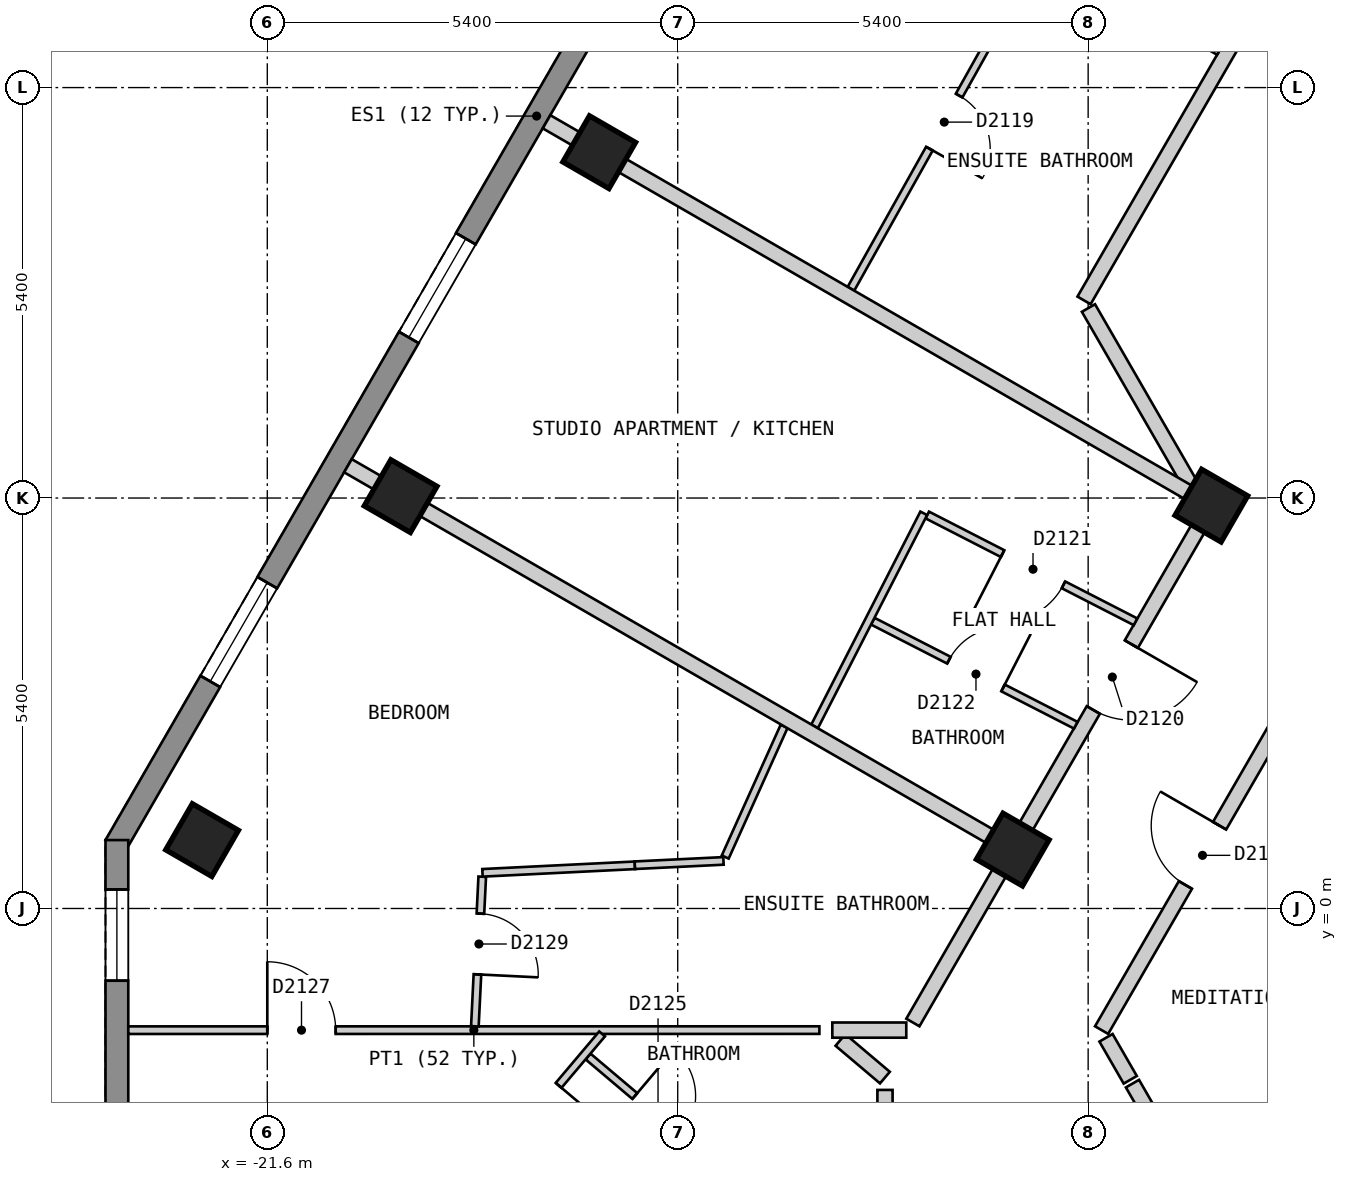
"""IFC4 building model, lengths in metres.
Left out: names, types, materials, properties, quantities, classifications, styles, units other than length and angle.
Written with IfcOpenShell. Run it as: python <this file> out.ifc"""

import sys

from ifc_helpers import new_model, si_unit, direction, frame, frame_2d, origin, origin_2d, place, context, subcontext, project, spatial, polyline, rectangle, outline, extrude, element, fill, save


model = new_model("IFC4")
c1 = context("Model", 3, precision=1e-05, world=origin(), true_north=direction((0.0, 1.0)))
c2 = subcontext(c1, "Body", "Model", "MODEL_VIEW")
j1 = project(units=[si_unit("LENGTHUNIT", "METRE"), si_unit("PLANEANGLEUNIT", "RADIAN")], contexts=[c1])
p1 = place(None, origin())
s1 = spatial("IfcSite", under=j1, at=p1, CompositionType="ELEMENT")
p2 = place(p1, origin())
s2 = spatial("IfcBuilding", under=s1, at=p2, CompositionType="ELEMENT")
p3 = place(p2, frame((0.0, 0.0, 211.8)))
s3 = spatial("IfcBuildingStorey", under=s2, at=p3, CompositionType="ELEMENT", Elevation=211.8)
for number, where, z_axis, x_axis in (
    (1, (-17.233, 9.95, 0.0), (0.0, 0.0, 1.0), (-0.5, -0.866, 0.0)),
    (2, (-19.846, 5.425, 0.0), (0.0, 0.0, 1.0), (-0.5, -0.866, 0.0)),
    (3, (-22.458, 0.9, 0.0), (0.0, 0.0, 1.0), (-0.5, -0.866, 0.0)),
    (4, (-9.179, 5.3, 0.0), (0.0, 0.0, 1.0), (-0.5, -0.866, 0.0)),
    (5, (-11.792, 0.775, 0.0), (0.0, 0.0, 1.0), (-0.5, -0.866, 0.0)),
):
    element("IfcColumn", number, at=place(p3, frame(where, z_axis=z_axis, x_axis=x_axis)), inside=s3, PredefinedType="COLUMN", context=c2, shape_type="SweptSolid", body=[
        extrude(rectangle(XDim=0.7, YDim=0.7, at=origin_2d()), origin(), (0.0, 0.0, 1.0), 3.0),
    ])
p4 = place(p3, frame((-12.514, 20.025, 0.0), z_axis=(0.0, 0.0, 1.0), x_axis=(-0.500003656944, -0.866023292436, 0.0)))
e6 = element("IfcWall", 6, at=p4, inside=s3, PredefinedType="SOLIDWALL", context=c2, shape_type="SweptSolid", body=[
    extrude(outline(polyline([(0.0, -0.15), (22.17, -0.15), (22.09, 0.15), (0.08, 0.15), (0.0, -0.15)])), origin(), (0.0, 0.0, 1.0), 2.7),
])
p5 = place(p4, frame((2.497, 0.0, 0.15)))
e7 = element("IfcOpeningElement", 7, at=p5, cuts=e6, PredefinedType="OPENING", context=c2, shape_type="SweptSolid", body=[
    extrude(rectangle(XDim=1.5, YDim=2.1, at=frame_2d((0.75, 1.05))), frame((0.0, 0.16, 0.0), z_axis=(0.0, -1.0, 0.0), x_axis=(1.0, 0.0, 0.0)), (0.0, 0.0, 1.0), 0.32),
])
p6 = place(p4, frame((7.722, 0.0, 0.15)))
e8 = element("IfcOpeningElement", 8, at=p6, cuts=e6, PredefinedType="OPENING", context=c2, shape_type="SweptSolid", body=[
    extrude(rectangle(XDim=1.5, YDim=2.1, at=frame_2d((0.75, 1.05))), frame((0.0, 0.16, 0.0), z_axis=(0.0, -1.0, 0.0), x_axis=(1.0, 0.0, 0.0)), (0.0, 0.0, 1.0), 0.32),
])
p7 = place(p4, frame((12.948, 0.0, 0.15)))
e9 = element("IfcOpeningElement", 9, at=p7, cuts=e6, PredefinedType="OPENING", context=c2, shape_type="SweptSolid", body=[
    extrude(rectangle(XDim=1.5, YDim=2.1, at=frame_2d((0.75, 1.05))), frame((0.0, 0.16, 0.0), z_axis=(0.0, -1.0, 0.0), x_axis=(1.0, 0.0, 0.0)), (0.0, 0.0, 1.0), 0.32),
])
p8 = place(p4, frame((18.173, 0.0, 0.15)))
e10 = element("IfcOpeningElement", 10, at=p8, cuts=e6, PredefinedType="OPENING", context=c2, shape_type="SweptSolid", body=[
    extrude(rectangle(XDim=1.5, YDim=2.1, at=frame_2d((0.75, 1.05))), frame((0.0, 0.16, 0.0), z_axis=(0.0, -1.0, 0.0), x_axis=(1.0, 0.0, 0.0)), (0.0, 0.0, 1.0), 0.32),
])
p9 = place(p3, frame((-23.579, 0.9, 0.0), z_axis=(0.0, 0.0, 1.0), x_axis=(0.0, -1.0, 0.0)))
e11 = element("IfcWall", 11, at=p9, inside=s3, PredefinedType="SOLIDWALL", context=c2, shape_type="SweptSolid", body=[
    extrude(outline(polyline([(0.0, -0.15), (5.0, -0.15), (4.92, 0.15), (0.08, 0.15), (0.0, -0.15)])), origin(), (0.0, 0.0, 1.0), 2.7),
])
p10 = place(p9, frame((0.65, 0.0, 0.15)))
e12 = element("IfcOpeningElement", 12, at=p10, cuts=e11, PredefinedType="OPENING", context=c2, shape_type="SweptSolid", body=[
    extrude(rectangle(XDim=1.2, YDim=2.1, at=frame_2d((0.6, 1.05))), frame((0.0, 0.16, 0.0), z_axis=(0.0, -1.0, 0.0), x_axis=(1.0, 0.0, 0.0)), (0.0, 0.0, 1.0), 0.32),
])
p11 = place(p3, frame((-10.796, 7.9, 0.0), z_axis=(0.0, 0.0, 1.0), x_axis=(0.499698840221, -0.866199208659, 0.0)))
e13 = element("IfcWall", 13, at=p11, inside=s3, PredefinedType="PARTITIONING", context=c2, shape_type="SweptSolid", body=[
    extrude(rectangle(XDim=2.685, YDim=0.2, at=frame_2d((1.343, 0.0))), origin(), (0.0, 0.0, 1.0), 2.7),
])
p12 = place(p3, frame((-10.565, -1.701, 0.0), z_axis=(0.0, 0.0, 1.0), x_axis=(0.499512735409, -0.866306543416, 0.0)))
e14 = element("IfcWall", 14, at=p12, inside=s3, PredefinedType="PARTITIONING", context=c2, shape_type="SweptSolid", body=[
    extrude(rectangle(XDim=0.638, YDim=0.2, at=frame_2d((0.319, 0.0))), origin(), (0.0, 0.0, 1.0), 2.7),
])
p13 = place(p3, frame((-10.217, -2.304, 0.0), z_axis=(0.0, 0.0, 1.0), x_axis=(0.499013081552, -0.866594452117, 0.0)))
e15 = element("IfcWall", 15, at=p13, inside=s3, PredefinedType="PARTITIONING", context=c2, shape_type="SweptSolid", body=[
    extrude(rectangle(XDim=0.457, YDim=0.2, at=frame_2d((0.229, 0.0))), origin(), (0.0, 0.0, 1.0), 2.7),
])
p14 = place(p3, frame((-10.623, -1.6, 0.0), z_axis=(0.0, 0.0, 1.0), x_axis=(0.500040865889, 0.866001808567, 0.0)))
e16 = element("IfcWall", 16, at=p14, inside=s3, PredefinedType="PARTITIONING", context=c2, shape_type="SweptSolid", body=[
    extrude(rectangle(XDim=5.31, YDim=0.2, at=frame_2d((2.655, 0.0))), origin(), (0.0, 0.0, 1.0), 2.7),
])
p15 = place(p14, frame((2.205, 0.0, 0.0)))
e17 = element("IfcOpeningElement", 17, at=p15, cuts=e16, PredefinedType="OPENING", context=c2, shape_type="SweptSolid", body=[
    extrude(rectangle(XDim=0.9, YDim=2.1, at=frame_2d((0.45, 1.05))), frame((0.0, 0.11, 0.0), z_axis=(0.0, -1.0, 0.0), x_axis=(1.0, 0.0, 0.0)), (0.0, 0.0, 1.0), 0.22),
])
p16 = place(p3, frame((-13.106, -1.5, 0.0), z_axis=(0.0, 0.0, 1.0), x_axis=(0.500025705601, 0.86601056214, 0.0)))
e18 = element("IfcWall", 18, at=p16, inside=s3, PredefinedType="PARTITIONING", context=c2, shape_type="SweptSolid", body=[
    extrude(rectangle(XDim=7.735, YDim=0.2, at=frame_2d((3.868, 0.0))), origin(), (0.0, 0.0, 1.0), 2.7),
])
p17 = place(p16, frame((4.748, 0.0, 0.0)))
e19 = element("IfcOpeningElement", 19, at=p17, cuts=e18, PredefinedType="OPENING", context=c2, shape_type="SweptSolid", body=[
    extrude(rectangle(XDim=1.0, YDim=2.1, at=frame_2d((0.5, 1.05))), frame((0.0, 0.11, 0.0), z_axis=(0.0, -1.0, 0.0), x_axis=(1.0, 0.0, 0.0)), (0.0, 0.0, 1.0), 0.22),
])
p18 = place(p3, frame((-10.854, 8.0, 0.0), z_axis=(0.0, 0.0, 1.0), x_axis=(0.499997637144, 0.866026767976, 0.0)))
e20 = element("IfcWall", 20, at=p18, inside=s3, PredefinedType="PARTITIONING", context=c2, shape_type="SweptSolid", body=[
    extrude(rectangle(XDim=10.854, YDim=0.2, at=frame_2d((5.427, 0.0))), origin(), (0.0, 0.0, 1.0), 2.7),
])
p19 = place(p18, frame((9.754, 0.0, 0.0)))
e21 = element("IfcOpeningElement", 21, at=p19, cuts=e20, PredefinedType="OPENING", context=c2, shape_type="SweptSolid", body=[
    extrude(rectangle(XDim=1.0, YDim=2.1, at=frame_2d((0.5, 1.05))), frame((0.0, 0.11, 0.0), z_axis=(0.0, -1.0, 0.0), x_axis=(1.0, 0.0, 0.0)), (0.0, 0.0, 1.0), 0.22),
])
p20 = place(p3, frame((-13.473, -2.799, 0.0), z_axis=(0.0, 0.0, 1.0), x_axis=(0.0, 1.0, 0.0)))
e22 = element("IfcWall", 22, at=p20, inside=s3, PredefinedType="PARTITIONING", context=c2, shape_type="SweptSolid", body=[
    extrude(rectangle(XDim=0.412, YDim=0.2, at=frame_2d((0.206, 0.0))), origin(), (0.0, 0.0, 1.0), 2.7),
])
p21 = place(p3, frame((-12.917, 5.177, 0.0), z_axis=(0.0, 0.0, 1.0), x_axis=(0.889829844516, -0.456292502467, 0.0)))
e23 = element("IfcWall", 23, at=p21, inside=s3, PredefinedType="PARTITIONING", context=c2, shape_type="SweptSolid", body=[
    extrude(rectangle(XDim=3.079, YDim=0.1, at=frame_2d((1.54, 0.0))), origin(), (0.0, 0.0, 1.0), 2.7),
])
p22 = place(p21, frame((1.114, 0.0, 0.0)))
e24 = element("IfcOpeningElement", 24, at=p22, cuts=e23, PredefinedType="OPENING", context=c2, shape_type="SweptSolid", body=[
    extrude(rectangle(XDim=0.9, YDim=2.1, at=frame_2d((0.45, 1.05))), frame((0.0, 0.06, 0.0), z_axis=(0.0, -1.0, 0.0), x_axis=(1.0, 0.0, 0.0)), (0.0, 0.0, 1.0), 0.12),
])
p23 = place(p3, frame((-13.634, 3.78, 0.0), z_axis=(0.0, 0.0, 1.0), x_axis=(0.889908901513, -0.456138298116, 0.0)))
e25 = element("IfcWall", 25, at=p23, inside=s3, PredefinedType="PARTITIONING", context=c2, shape_type="SweptSolid", body=[
    extrude(rectangle(XDim=3.002, YDim=0.1, at=frame_2d((1.501, 0.0))), origin(), (0.0, 0.0, 1.0), 2.7),
])
p24 = place(p23, frame((1.126, 0.0, 0.0)))
e26 = element("IfcOpeningElement", 26, at=p24, cuts=e25, PredefinedType="OPENING", context=c2, shape_type="SweptSolid", body=[
    extrude(rectangle(XDim=0.8, YDim=2.1, at=frame_2d((0.4, 1.05))), frame((0.0, 0.06, 0.0), z_axis=(0.0, -1.0, 0.0), x_axis=(1.0, 0.0, 0.0)), (0.0, 0.0, 1.0), 0.12),
])
p25 = place(p3, frame((-15.314, 14.875, 0.0), z_axis=(0.0, 0.0, 1.0), x_axis=(0.866001485781, -0.500041424909, 0.0)))
e27 = element("IfcWall", 27, at=p25, inside=s3, PredefinedType="PARTITIONING", context=c2, shape_type="SweptSolid", body=[
    extrude(rectangle(XDim=7.2, YDim=0.1, at=frame_2d((3.6, 0.0))), origin(), (0.0, 0.0, 1.0), 2.7),
])
p26 = place(p25, frame((1.8, 0.0, 0.0)))
e28 = element("IfcOpeningElement", 28, at=p26, cuts=e27, PredefinedType="OPENING", context=c2, shape_type="SweptSolid", body=[
    extrude(rectangle(XDim=0.9, YDim=2.1, at=frame_2d((0.45, 1.05))), frame((0.0, 0.06, 0.0), z_axis=(0.0, -1.0, 0.0), x_axis=(1.0, 0.0, 0.0)), (0.0, 0.0, 1.0), 0.12),
])
p27 = place(p3, frame((-17.38, -1.947, 0.0), z_axis=(0.0, 0.0, 1.0), x_axis=(0.763616683524, -0.645669854217, 0.0)))
e29 = element("IfcWall", 29, at=p27, inside=s3, PredefinedType="PARTITIONING", context=c2, shape_type="SweptSolid", body=[
    extrude(rectangle(XDim=2.331, YDim=0.1, at=frame_2d((1.166, 0.0))), origin(), (0.0, 0.0, 1.0), 2.7),
])
p28 = place(p27, frame((0.806, 0.0, 0.0)))
e30 = element("IfcOpeningElement", 30, at=p28, cuts=e29, PredefinedType="OPENING", context=c2, shape_type="SweptSolid", body=[
    extrude(rectangle(XDim=0.8, YDim=2.1, at=frame_2d((0.4, 1.05))), frame((0.0, 0.06, 0.0), z_axis=(0.0, -1.0, 0.0), x_axis=(1.0, 0.0, 0.0)), (0.0, 0.0, 1.0), 0.12),
])
p29 = place(p3, frame((-23.429, -1.601, 0.0), z_axis=(0.0, 0.0, 1.0), x_axis=(0.999999994233, 0.000107396965, 0.0)))
e31 = element("IfcWall", 31, at=p29, inside=s3, PredefinedType="PARTITIONING", context=c2, shape_type="SweptSolid", body=[
    extrude(rectangle(XDim=9.093, YDim=0.1, at=frame_2d((4.546, 0.0))), origin(), (0.0, 0.0, 1.0), 2.7),
])
p30 = place(p29, frame((1.829, 0.0, 0.0)))
e32 = element("IfcOpeningElement", 32, at=p30, cuts=e31, PredefinedType="OPENING", context=c2, shape_type="SweptSolid", body=[
    extrude(rectangle(XDim=0.9, YDim=2.1, at=frame_2d((0.45, 1.05))), frame((0.0, 0.06, 0.0), z_axis=(0.0, -1.0, 0.0), x_axis=(1.0, 0.0, 0.0)), (0.0, 0.0, 1.0), 0.12),
])
p31 = place(p3, frame((-20.188, -5.191, 0.0), z_axis=(0.0, 0.0, 1.0), x_axis=(0.645524337256, 0.763739700429, 0.0)))
e33 = element("IfcWall", 33, at=p31, inside=s3, PredefinedType="PARTITIONING", context=c2, shape_type="SweptSolid", body=[
    extrude(rectangle(XDim=4.636, YDim=0.1, at=frame_2d((2.318, 0.0))), origin(), (0.0, 0.0, 1.0), 2.7),
])
p32 = place(p31, frame((2.85, 0.0, 0.0)))
e34 = element("IfcOpeningElement", 34, at=p32, cuts=e33, PredefinedType="OPENING", context=c2, shape_type="SweptSolid", body=[
    extrude(rectangle(XDim=0.9, YDim=2.1, at=frame_2d((0.45, 1.05))), frame((0.0, 0.06, 0.0), z_axis=(0.0, -1.0, 0.0), x_axis=(1.0, 0.0, 0.0)), (0.0, 0.0, 1.0), 0.12),
])
p33 = place(p3, frame((-15.575, 0.677, 0.0), z_axis=(0.0, 0.0, 1.0), x_axis=(0.410768223147, 0.911739802165, 0.0)))
e35 = element("IfcWall", 35, at=p33, inside=s3, PredefinedType="PARTITIONING", context=c2, shape_type="SweptSolid", body=[
    extrude(rectangle(XDim=1.886, YDim=0.1, at=frame_2d((0.943, 0.0))), origin(), (0.0, 0.0, 1.0), 2.7),
])
p34 = place(p3, frame((-13.921, 8.153, 0.0), z_axis=(0.0, 0.0, 1.0), x_axis=(0.488568218554, 0.872525699231, 0.0)))
e36 = element("IfcWall", 36, at=p34, inside=s3, PredefinedType="PARTITIONING", context=c2, shape_type="SweptSolid", body=[
    extrude(rectangle(XDim=5.076, YDim=0.1, at=frame_2d((2.538, 0.0))), origin(), (0.0, 0.0, 1.0), 2.7),
])
p35 = place(p34, frame((2.113, 0.0, 0.0)))
e37 = element("IfcOpeningElement", 37, at=p35, cuts=e36, PredefinedType="OPENING", context=c2, shape_type="SweptSolid", body=[
    extrude(rectangle(XDim=0.8, YDim=2.1, at=frame_2d((0.4, 1.05))), frame((0.0, 0.06, 0.0), z_axis=(0.0, -1.0, 0.0), x_axis=(1.0, 0.0, 0.0)), (0.0, 0.0, 1.0), 0.12),
])
p36 = place(p3, frame((-14.399, 2.396, 0.0), z_axis=(0.0, 0.0, 1.0), x_axis=(0.455967231787, 0.889996563778, 0.0)))
e38 = element("IfcWall", 38, at=p36, inside=s3, PredefinedType="PARTITIONING", context=c2, shape_type="SweptSolid", body=[
    extrude(rectangle(XDim=3.149, YDim=0.1, at=frame_2d((1.575, 0.0))), origin(), (0.0, 0.0, 1.0), 2.7),
])
p37 = place(p3, frame((-18.869, -1.55, 0.0), z_axis=(0.0, 0.0, 1.0), x_axis=(0.049189853645, 0.998789446429, 0.0)))
e39 = element("IfcWall", 39, at=p37, inside=s3, PredefinedType="PARTITIONING", context=c2, shape_type="SweptSolid", body=[
    extrude(rectangle(XDim=1.97, YDim=0.1, at=frame_2d((0.985, 0.0))), origin(), (0.0, 0.0, 1.0), 2.7),
])
p38 = place(p37, frame((0.684, 0.0, 0.0)))
e40 = element("IfcOpeningElement", 40, at=p38, cuts=e39, PredefinedType="OPENING", context=c2, shape_type="SweptSolid", body=[
    extrude(rectangle(XDim=0.8, YDim=2.1, at=frame_2d((0.4, 1.05))), frame((0.0, 0.06, 0.0), z_axis=(0.0, -1.0, 0.0), x_axis=(1.0, 0.0, 0.0)), (0.0, 0.0, 1.0), 0.12),
])
p39 = place(p3, frame((-18.769, 0.469, 0.0), z_axis=(0.0, 0.0, 1.0), x_axis=(0.998780383332, 0.049373534108, 0.0)))
e41 = element("IfcWall", 41, at=p39, inside=s3, PredefinedType="PARTITIONING", context=c2, shape_type="SweptSolid", body=[
    extrude(rectangle(XDim=2.008, YDim=0.1, at=frame_2d((1.004, 0.0))), origin(), (0.0, 0.0, 1.0), 2.7),
])
p40 = place(p3, frame((-16.764, 0.569, 0.0), z_axis=(0.0, 0.0, 1.0), x_axis=(0.998812102885, 0.048727642373, 0.0)))
e42 = element("IfcWall", 42, at=p40, inside=s3, PredefinedType="PARTITIONING", context=c2, shape_type="SweptSolid", body=[
    extrude(rectangle(XDim=1.167, YDim=0.1, at=frame_2d((0.584, 0.0))), origin(), (0.0, 0.0, 1.0), 2.7),
])
p41 = place(p3, frame((-20.539, 5.825, 0.0), z_axis=(0.0, 0.0, 1.0), x_axis=(0.866046068403, -0.499964206122, 0.0)))
e43 = element("IfcWall", 43, at=p41, inside=s3, PredefinedType="PARTITIONING", context=c2, shape_type="SweptSolid", body=[
    extrude(rectangle(XDim=9.995, YDim=0.2, at=frame_2d((4.998, 0.0))), origin(), (0.0, 0.0, 1.0), 2.7),
])
p42 = place(p3, frame((-17.926, 10.35, 0.0), z_axis=(0.0, 0.0, 1.0), x_axis=(0.866018411306, -0.500012111133, 0.0)))
e44 = element("IfcWall", 44, at=p42, inside=s3, PredefinedType="PARTITIONING", context=c2, shape_type="SweptSolid", body=[
    extrude(rectangle(XDim=9.898, YDim=0.2, at=frame_2d((4.949, 0.0))), origin(), (0.0, 0.0, 1.0), 2.7),
])
p43 = place(p3, frame((-14.059, -1.73, 0.0), z_axis=(0.0, 0.0, 1.0), x_axis=(0.763289607824, -0.64605647941, 0.0)))
e45 = element("IfcWall", 45, at=p43, inside=s3, PredefinedType="PARTITIONING", context=c2, shape_type="SweptSolid", body=[
    extrude(rectangle(XDim=0.766, YDim=0.2, at=frame_2d((0.383, 0.0))), origin(), (0.0, 0.0, 1.0), 2.7),
])
p44 = place(p3, frame((-14.166, -1.6, 0.0), z_axis=(0.0, 0.0, 1.0), x_axis=(1.0, 0.0, 0.0)))
e46 = element("IfcWall", 46, at=p44, inside=s3, PredefinedType="PARTITIONING", context=c2, shape_type="SweptSolid", body=[
    extrude(rectangle(XDim=0.973, YDim=0.2, at=frame_2d((0.486, 0.0))), origin(), (0.0, 0.0, 1.0), 2.7),
])
p45 = place(p7, origin())
e47 = element("IfcWindow", 47, at=p45, inside=s3, PartitioningType="SINGLE_PANEL", PredefinedType="WINDOW", context=c2, shape_type="SweptSolid", body=[
    extrude(rectangle(XDim=1.5, YDim=2.1, at=frame_2d((0.75, 1.05))), frame((0.0, 0.03, 0.0), z_axis=(0.0, -1.0, 0.0), x_axis=(1.0, 0.0, 0.0)), (0.0, 0.0, 1.0), 0.06),
])
fill(e9, e47)
p46 = place(p8, origin())
e48 = element("IfcWindow", 48, at=p46, inside=s3, PartitioningType="SINGLE_PANEL", PredefinedType="WINDOW", context=c2, shape_type="SweptSolid", body=[
    extrude(rectangle(XDim=1.5, YDim=2.1, at=frame_2d((0.75, 1.05))), frame((0.0, 0.03, 0.0), z_axis=(0.0, -1.0, 0.0), x_axis=(1.0, 0.0, 0.0)), (0.0, 0.0, 1.0), 0.06),
])
fill(e10, e48)
p47 = place(p10, origin())
e49 = element("IfcWindow", 49, at=p47, inside=s3, PartitioningType="SINGLE_PANEL", PredefinedType="WINDOW", context=c2, shape_type="SweptSolid", body=[
    extrude(rectangle(XDim=1.2, YDim=2.1, at=frame_2d((0.6, 1.05))), frame((0.0, 0.03, 0.0), z_axis=(0.0, -1.0, 0.0), x_axis=(1.0, 0.0, 0.0)), (0.0, 0.0, 1.0), 0.06),
])
fill(e12, e49)
p48 = place(p35, origin())
e50 = element("IfcDoor", 50, at=p48, inside=s3, OperationType="SINGLE_SWING_LEFT", PredefinedType="DOOR", context=c2, shape_type="SweptSolid", body=[
    extrude(rectangle(XDim=0.8, YDim=2.1, at=frame_2d((0.4, 1.05))), frame((0.0, 0.025, 0.0), z_axis=(0.0, -1.0, 0.0), x_axis=(1.0, 0.0, 0.0)), (0.0, 0.0, 1.0), 0.05),
])
fill(e37, e50)
p49 = place(p17, origin())
e51 = element("IfcDoor", 51, at=p49, inside=s3, OperationType="SINGLE_SWING_RIGHT", PredefinedType="DOOR", context=c2, shape_type="SweptSolid", body=[
    extrude(rectangle(XDim=1.0, YDim=2.1, at=frame_2d((0.5, 1.05))), frame((0.0, 0.025, 0.0), z_axis=(0.0, -1.0, 0.0), x_axis=(1.0, 0.0, 0.0)), (0.0, 0.0, 1.0), 0.05),
])
fill(e19, e51)
p50 = place(p22, origin())
e52 = element("IfcDoor", 52, at=p50, inside=s3, OperationType="SINGLE_SWING_LEFT", PredefinedType="DOOR", context=c2, shape_type="SweptSolid", body=[
    extrude(rectangle(XDim=0.9, YDim=2.1, at=frame_2d((0.45, 1.05))), frame((0.0, 0.025, 0.0), z_axis=(0.0, -1.0, 0.0), x_axis=(1.0, 0.0, 0.0)), (0.0, 0.0, 1.0), 0.05),
])
fill(e24, e52)
p51 = place(p24, origin())
e53 = element("IfcDoor", 53, at=p51, inside=s3, OperationType="SINGLE_SWING_RIGHT", PredefinedType="DOOR", context=c2, shape_type="SweptSolid", body=[
    extrude(rectangle(XDim=0.8, YDim=2.1, at=frame_2d((0.4, 1.05))), frame((0.0, 0.025, 0.0), z_axis=(0.0, -1.0, 0.0), x_axis=(1.0, 0.0, 0.0)), (0.0, 0.0, 1.0), 0.05),
])
fill(e26, e53)
p52 = place(p28, origin())
e54 = element("IfcDoor", 54, at=p52, inside=s3, OperationType="SINGLE_SWING_LEFT", PredefinedType="DOOR", context=c2, shape_type="SweptSolid", body=[
    extrude(rectangle(XDim=0.8, YDim=2.1, at=frame_2d((0.4, 1.05))), frame((0.0, 0.025, 0.0), z_axis=(0.0, -1.0, 0.0), x_axis=(1.0, 0.0, 0.0)), (0.0, 0.0, 1.0), 0.05),
])
fill(e30, e54)
p53 = place(p32, origin())
e55 = element("IfcDoor", 55, at=p53, inside=s3, OperationType="SINGLE_SWING_RIGHT", PredefinedType="DOOR", context=c2, shape_type="SweptSolid", body=[
    extrude(rectangle(XDim=0.9, YDim=2.1, at=frame_2d((0.45, 1.05))), frame((0.0, 0.025, 0.0), z_axis=(0.0, -1.0, 0.0), x_axis=(1.0, 0.0, 0.0)), (0.0, 0.0, 1.0), 0.05),
])
fill(e34, e55)
p54 = place(p30, origin())
e56 = element("IfcDoor", 56, at=p54, inside=s3, OperationType="SINGLE_SWING_LEFT", PredefinedType="DOOR", context=c2, shape_type="SweptSolid", body=[
    extrude(rectangle(XDim=0.9, YDim=2.1, at=frame_2d((0.45, 1.05))), frame((0.0, 0.025, 0.0), z_axis=(0.0, -1.0, 0.0), x_axis=(1.0, 0.0, 0.0)), (0.0, 0.0, 1.0), 0.05),
])
fill(e32, e56)
p55 = place(p38, origin())
e57 = element("IfcDoor", 57, at=p55, inside=s3, OperationType="SINGLE_SWING_LEFT", PredefinedType="DOOR", context=c2, shape_type="SweptSolid", body=[
    extrude(rectangle(XDim=0.8, YDim=2.1, at=frame_2d((0.4, 1.05))), frame((0.0, 0.025, 0.0), z_axis=(0.0, -1.0, 0.0), x_axis=(1.0, 0.0, 0.0)), (0.0, 0.0, 1.0), 0.05),
])
fill(e40, e57)
p56 = place(p15, origin())
e58 = element("IfcDoor", 58, at=p56, inside=s3, OperationType="SINGLE_SWING_RIGHT", PredefinedType="DOOR", context=c2, shape_type="SweptSolid", body=[
    extrude(rectangle(XDim=0.9, YDim=2.1, at=frame_2d((0.45, 1.05))), frame((0.0, 0.025, 0.0), z_axis=(0.0, -1.0, 0.0), x_axis=(1.0, 0.0, 0.0)), (0.0, 0.0, 1.0), 0.05),
])
fill(e17, e58)
save(model, sys.argv[1])
